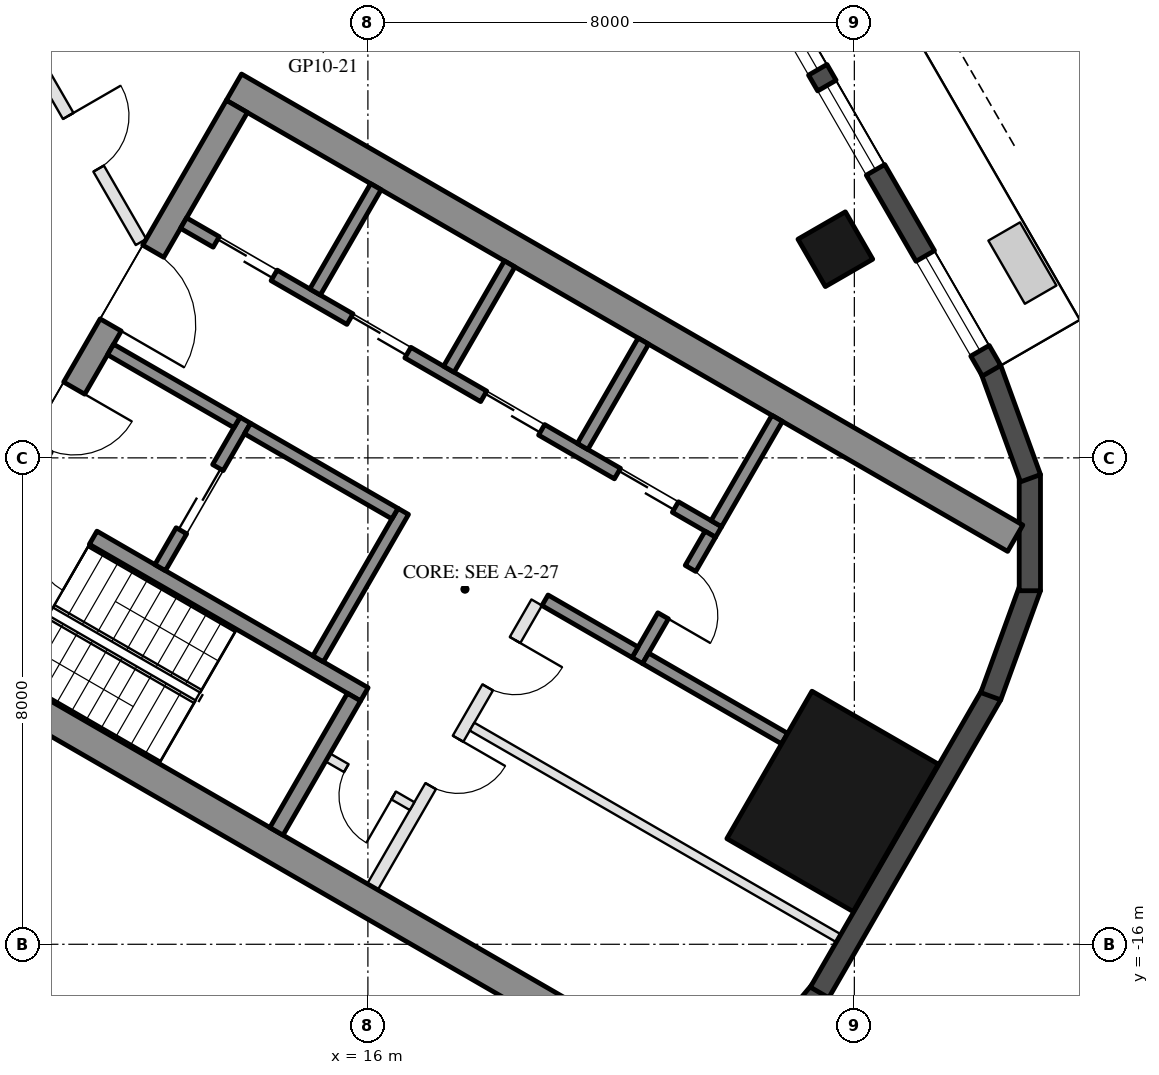
"""IFC4 building model, lengths in metres.
Left out: names, types, materials, properties, quantities, classifications, styles, units other than length and angle.
Written with IfcOpenShell. Run it as: python <this file> out.ifc"""

import sys

from ifc_helpers import new_model, si_unit, direction, frame, frame_2d, origin, origin_2d, place, context, subcontext, project, spatial, rectangle, hollow_rectangle, extrude, element, fill, save


model = new_model("IFC4")
c1 = context("Model", 3, precision=1e-05, world=origin(), true_north=direction((0.0, 1.0)))
c2 = subcontext(c1, "Body", "Model", "MODEL_VIEW")
j1 = project(units=[si_unit("LENGTHUNIT", "METRE"), si_unit("PLANEANGLEUNIT", "RADIAN")], contexts=[c1])
p1 = place(None, origin())
s1 = spatial("IfcSite", under=j1, at=p1, CompositionType="ELEMENT")
p2 = place(p1, origin())
s2 = spatial("IfcBuilding", under=s1, at=p2, CompositionType="ELEMENT")
p3 = place(p2, frame((0.0, 0.0, 120.5)))
s3 = spatial("IfcBuildingStorey", under=s2, at=p3, CompositionType="ELEMENT", Elevation=120.5)
p4 = place(p3, frame((23.688, -4.568, 0.0), z_axis=(0.0, 0.0, 1.0), x_axis=(-0.5, 0.866025403784, 0.0)))
e1 = element("IfcColumn", 1, at=p4, inside=s3, PredefinedType="COLUMN", context=c2, shape_type="SweptSolid", body=[
    extrude(hollow_rectangle(XDim=0.9, YDim=0.9, WallThickness=0.04, at=origin_2d()), origin(), (0.0, 0.0, 1.0), 3.7),
])
p5 = place(p3, frame((23.643, -13.65, 0.0), z_axis=(0.0, 0.0, 1.0), x_axis=(0.5, 0.866025403784, 0.0)))
e2 = element("IfcColumn", 2, at=p5, inside=s3, PredefinedType="COLUMN", context=c2, shape_type="SweptSolid", body=[
    extrude(hollow_rectangle(XDim=2.8, YDim=2.4, WallThickness=0.07, at=origin_2d()), origin(), (0.0, 0.0, 1.0), 3.7),
])
p6 = place(p3, frame((22.217, -18.231, 0.0), z_axis=(0.0, 0.0, 1.0), x_axis=(0.642733291068, 0.76609001857, 0.0)))
e3 = element("IfcWall", 3, at=p6, inside=s3, PredefinedType="SOLIDWALL", context=c2, shape_type="SweptSolid", body=[
    extrude(rectangle(XDim=1.91, YDim=0.35, at=frame_2d((0.955, 0.0))), origin(), (0.0, 0.0, 1.0), 3.55),
])
p7 = place(p3, frame((23.427, -16.792, 0.0), z_axis=(0.0, 0.0, 1.0), x_axis=(0.500018773155, 0.866014564827, 0.0)))
e4 = element("IfcWall", 4, at=p7, inside=s3, PredefinedType="SOLIDWALL", context=c2, shape_type="SweptSolid", body=[
    extrude(rectangle(XDim=5.658, YDim=0.35, at=frame_2d((2.829, 0.0))), origin(), (0.0, 0.0, 1.0), 3.55),
])
for number, where, z_axis, x_axis in (
    (5, (26.244, -11.92, 0.0), (0.0, 0.0, 1.0), (0.342, 0.94, 0.0)),
    (6, (26.886, -10.185, 0.0), (0.0, 0.0, 1.0), (0.0, 1.0, 0.0)),
    (7, (26.897, -8.335, 0.0), (0.0, 0.0, 1.0), (-0.342, 0.94, 0.0)),
):
    element("IfcWall", number, at=place(p3, frame(where, z_axis=z_axis, x_axis=x_axis)), inside=s3, PredefinedType="SOLIDWALL", context=c2, shape_type="SweptSolid", body=[
        extrude(rectangle(XDim=1.91, YDim=0.35, at=frame_2d((0.955, 0.0))), origin(), (0.0, 0.0, 1.0), 3.55),
    ])
p8 = place(p3, frame((26.257, -6.567, 0.0), z_axis=(0.0, 0.0, 1.0), x_axis=(-0.500023526245, 0.866011820475, 0.0)))
e8 = element("IfcWall", 8, at=p8, inside=s3, PredefinedType="SOLIDWALL", context=c2, shape_type="SweptSolid", body=[
    extrude(rectangle(XDim=11.816, YDim=0.35, at=frame_2d((5.908, 0.0))), origin(), (0.0, 0.0, 1.0), 3.55),
])
p9 = place(p8, frame((0.38, 0.0, 0.3)))
e9 = element("IfcOpeningElement", 9, at=p9, cuts=e8, PredefinedType="OPENING", context=c2, shape_type="SweptSolid", body=[
    extrude(rectangle(XDim=1.8, YDim=2.65, at=frame_2d((0.9, 1.325))), frame((0.0, 0.185, 0.0), z_axis=(0.0, -1.0, 0.0), x_axis=(1.0, 0.0, 0.0)), (0.0, 0.0, 1.0), 0.37),
])
p10 = place(p8, frame((7.716, 0.0, 0.0)))
e10 = element("IfcOpeningElement", 10, at=p10, cuts=e8, PredefinedType="OPENING", context=c2, shape_type="SweptSolid", body=[
    extrude(rectangle(XDim=2.4, YDim=2.4, at=frame_2d((1.2, 1.2))), frame((0.0, 0.185, 0.0), z_axis=(0.0, -1.0, 0.0), x_axis=(1.0, 0.0, 0.0)), (0.0, 0.0, 1.0), 0.37),
])
p11 = place(p8, frame((3.816, 0.0, 0.3)))
e11 = element("IfcOpeningElement", 11, at=p11, cuts=e8, PredefinedType="OPENING", context=c2, shape_type="SweptSolid", body=[
    extrude(rectangle(XDim=1.6, YDim=2.65, at=frame_2d((0.8, 1.325))), frame((0.0, 0.185, 0.0), z_axis=(0.0, -1.0, 0.0), x_axis=(1.0, 0.0, 0.0)), (0.0, 0.0, 1.0), 0.37),
])
p12 = place(p8, frame((5.716, 0.0, 0.3)))
e12 = element("IfcOpeningElement", 12, at=p12, cuts=e8, PredefinedType="OPENING", context=c2, shape_type="SweptSolid", body=[
    extrude(rectangle(XDim=1.6, YDim=2.65, at=frame_2d((0.8, 1.325))), frame((0.0, 0.185, 0.0), z_axis=(0.0, -1.0, 0.0), x_axis=(1.0, 0.0, 0.0)), (0.0, 0.0, 1.0), 0.37),
])
for number, where, z_axis, x_axis in (
    (13, (8.547, -10.997, 0.0), (0.0, 0.0, 1.0), (0.866, -0.5, 0.0)),
    (14, (13.797, -1.903, 0.0), (0.0, 0.0, 1.0), (0.866, -0.5, 0.0)),
):
    element("IfcWall", number, at=place(p3, frame(where, z_axis=z_axis, x_axis=x_axis)), inside=s3, PredefinedType="SHEAR", context=c2, shape_type="SweptSolid", body=[
        extrude(rectangle(XDim=14.837, YDim=0.5, at=frame_2d((7.418, 0.0))), origin(), (0.0, 0.0, 1.0), 3.5),
    ])
p13 = place(p3, frame((8.845, -10.88, 0.0), z_axis=(0.0, 0.0, 1.0), x_axis=(0.500004234368, 0.866022959057, 0.0)))
e15 = element("IfcWall", 15, at=p13, inside=s3, PredefinedType="SHEAR", context=c2, shape_type="SweptSolid", body=[
    extrude(rectangle(XDim=10.0, YDim=0.4, at=frame_2d((5.0, 0.0))), origin(), (0.0, 0.0, 1.0), 3.5),
])
p14 = place(p13, frame((3.55, 0.0, 0.0)))
e16 = element("IfcOpeningElement", 16, at=p14, cuts=e15, PredefinedType="OPENING", context=c2, shape_type="SweptSolid", body=[
    extrude(rectangle(XDim=1.1, YDim=2.1, at=frame_2d((0.55, 1.05))), frame((0.0, 0.21, 0.0), z_axis=(0.0, -1.0, 0.0), x_axis=(1.0, 0.0, 0.0)), (0.0, 0.0, 1.0), 0.42),
])
p15 = place(p13, frame((5.85, 0.0, 0.0)))
e17 = element("IfcOpeningElement", 17, at=p15, cuts=e15, PredefinedType="OPENING", context=c2, shape_type="SweptSolid", body=[
    extrude(rectangle(XDim=1.4, YDim=2.1, at=frame_2d((0.7, 1.05))), frame((0.0, 0.21, 0.0), z_axis=(0.0, -1.0, 0.0), x_axis=(1.0, 0.0, 0.0)), (0.0, 0.0, 1.0), 0.42),
])
p16 = place(p3, frame((10.356, -8.664, 0.0), z_axis=(0.0, 0.0, 1.0), x_axis=(0.866028629588, -0.499994412703, 0.0)))
e18 = element("IfcWall", 18, at=p16, inside=s3, PredefinedType="SHEAR", context=c2, shape_type="SweptSolid", body=[
    extrude(rectangle(XDim=6.45, YDim=0.25, at=frame_2d((3.225, 0.0))), origin(), (0.0, 0.0, 1.0), 3.5),
])
p17 = place(p16, frame((0.3, 0.0, 0.0)))
e19 = element("IfcOpeningElement", 19, at=p17, cuts=e18, PredefinedType="OPENING", context=c2, shape_type="SweptSolid", body=[
    extrude(rectangle(XDim=1.0, YDim=2.1, at=frame_2d((0.5, 1.05))), frame((0.0, 0.135, 0.0), z_axis=(0.0, -1.0, 0.0), x_axis=(1.0, 0.0, 0.0)), (0.0, 0.0, 1.0), 0.27),
])
p18 = place(p3, frame((14.496, -14.143, 0.0), z_axis=(0.0, 0.0, 1.0), x_axis=(0.500062241894, 0.865989465428, 0.0)))
e20 = element("IfcWall", 20, at=p18, inside=s3, PredefinedType="SHEAR", context=c2, shape_type="SweptSolid", body=[
    extrude(rectangle(XDim=2.55, YDim=0.25, at=frame_2d((1.275, 0.0))), origin(), (0.0, 0.0, 1.0), 3.5),
])
p19 = place(p3, frame((15.181, -11.305, 0.0), z_axis=(0.0, 0.0, 1.0), x_axis=(0.49994636267, 0.866056369097, 0.0)))
e21 = element("IfcWall", 21, at=p19, inside=s3, PredefinedType="SHEAR", context=c2, shape_type="SweptSolid", body=[
    extrude(rectangle(XDim=2.8, YDim=0.2, at=frame_2d((1.4, 0.0))), origin(), (0.0, 0.0, 1.0), 3.5),
])
p20 = place(p3, frame((12.583, -9.805, 0.0), z_axis=(0.0, 0.0, 1.0), x_axis=(0.49994636267, 0.866056369097, 0.0)))
e22 = element("IfcWall", 22, at=p20, inside=s3, PredefinedType="SHEAR", context=c2, shape_type="SweptSolid", body=[
    extrude(rectangle(XDim=2.8, YDim=0.2, at=frame_2d((1.4, 0.0))), origin(), (0.0, 0.0, 1.0), 3.5),
])
p21 = place(p20, frame((0.7, 0.0, 0.0)))
e23 = element("IfcOpeningElement", 23, at=p21, cuts=e22, PredefinedType="OPENING", context=c2, shape_type="SweptSolid", body=[
    extrude(rectangle(XDim=1.2, YDim=2.1, at=frame_2d((0.6, 1.05))), frame((0.0, 0.11, 0.0), z_axis=(0.0, -1.0, 0.0), x_axis=(1.0, 0.0, 0.0)), (0.0, 0.0, 1.0), 0.22),
])
p22 = place(p3, frame((11.768, -6.217, 0.0), z_axis=(0.0, 0.0, 1.0), x_axis=(0.866050077142, -0.499957262057, 0.0)))
e24 = element("IfcWall", 24, at=p22, inside=s3, PredefinedType="SHEAR", context=c2, shape_type="SweptSolid", body=[
    extrude(rectangle(XDim=2.4, YDim=0.2, at=frame_2d((1.2, 0.0))), origin(), (0.0, 0.0, 1.0), 3.5),
])
p23 = place(p3, frame((14.02, -7.517, 0.0), z_axis=(0.0, 0.0, 1.0), x_axis=(0.866034573852, -0.49998411664, 0.0)))
e25 = element("IfcWall", 25, at=p23, inside=s3, PredefinedType="SHEAR", context=c2, shape_type="SweptSolid", body=[
    extrude(rectangle(XDim=2.8, YDim=0.2, at=frame_2d((1.4, 0.0))), origin(), (0.0, 0.0, 1.0), 3.5),
])
p24 = place(p3, frame((12.968, -4.138, 0.0), z_axis=(0.0, 0.0, 1.0), x_axis=(0.866028328073, -0.49999493495, 0.0)))
e26 = element("IfcWall", 26, at=p24, inside=s3, PredefinedType="SHEAR", context=c2, shape_type="SweptSolid", body=[
    extrude(rectangle(XDim=10.16, YDim=0.2, at=frame_2d((5.08, 0.0))), origin(), (0.0, 0.0, 1.0), 3.5),
])
p25 = place(p24, frame((0.62, 0.0, 0.0)))
e27 = element("IfcOpeningElement", 27, at=p25, cuts=e26, PredefinedType="OPENING", context=c2, shape_type="SweptSolid", body=[
    extrude(rectangle(XDim=1.1, YDim=2.1, at=frame_2d((0.55, 1.05))), frame((0.0, 0.11, 0.0), z_axis=(0.0, -1.0, 0.0), x_axis=(1.0, 0.0, 0.0)), (0.0, 0.0, 1.0), 0.22),
])
p26 = place(p24, frame((3.16, 0.0, 0.0)))
e28 = element("IfcOpeningElement", 28, at=p26, cuts=e26, PredefinedType="OPENING", context=c2, shape_type="SweptSolid", body=[
    extrude(rectangle(XDim=1.1, YDim=2.1, at=frame_2d((0.55, 1.05))), frame((0.0, 0.11, 0.0), z_axis=(0.0, -1.0, 0.0), x_axis=(1.0, 0.0, 0.0)), (0.0, 0.0, 1.0), 0.22),
])
p27 = place(p24, frame((5.7, 0.0, 0.0)))
e29 = element("IfcOpeningElement", 29, at=p27, cuts=e26, PredefinedType="OPENING", context=c2, shape_type="SweptSolid", body=[
    extrude(rectangle(XDim=1.1, YDim=2.1, at=frame_2d((0.55, 1.05))), frame((0.0, 0.11, 0.0), z_axis=(0.0, -1.0, 0.0), x_axis=(1.0, 0.0, 0.0)), (0.0, 0.0, 1.0), 0.22),
])
p28 = place(p24, frame((8.24, 0.0, 0.0)))
e30 = element("IfcOpeningElement", 30, at=p28, cuts=e26, PredefinedType="OPENING", context=c2, shape_type="SweptSolid", body=[
    extrude(rectangle(XDim=1.1, YDim=2.1, at=frame_2d((0.55, 1.05))), frame((0.0, 0.11, 0.0), z_axis=(0.0, -1.0, 0.0), x_axis=(1.0, 0.0, 0.0)), (0.0, 0.0, 1.0), 0.22),
])
p29 = place(p3, frame((20.43, -11.333, 0.0), z_axis=(0.0, 0.0, 1.0), x_axis=(0.500001309137, 0.866024647952, 0.0)))
e31 = element("IfcWall", 31, at=p29, inside=s3, PredefinedType="SHEAR", context=c2, shape_type="SweptSolid", body=[
    extrude(rectangle(XDim=2.4, YDim=0.2, at=frame_2d((1.2, 0.0))), origin(), (0.0, 0.0, 1.0), 3.5),
])
p30 = place(p29, frame((0.85, 0.0, 0.0)))
e32 = element("IfcOpeningElement", 32, at=p30, cuts=e31, PredefinedType="OPENING", context=c2, shape_type="SweptSolid", body=[
    extrude(rectangle(XDim=0.9, YDim=2.1, at=frame_2d((0.45, 1.05))), frame((0.0, 0.11, 0.0), z_axis=(0.0, -1.0, 0.0), x_axis=(1.0, 0.0, 0.0)), (0.0, 0.0, 1.0), 0.22),
])
p31 = place(p3, frame((18.913, -10.342, 0.0), z_axis=(0.0, 0.0, 1.0), x_axis=(0.866038183914, -0.499977863513, 0.0)))
e33 = element("IfcWall", 33, at=p31, inside=s3, PredefinedType="SHEAR", context=c2, shape_type="SweptSolid", body=[
    extrude(rectangle(XDim=1.71, YDim=0.2, at=frame_2d((0.855, 0.0))), origin(), (0.0, 0.0, 1.0), 3.5),
])
for number, where, z_axis, x_axis in (
    (34, (15.131, -5.272, 0.0), (0.0, 0.0, 1.0), (0.5, 0.866, 0.0)),
    (35, (17.331, -6.542, 0.0), (0.0, 0.0, 1.0), (0.5, 0.866, 0.0)),
    (36, (19.531, -7.812, 0.0), (0.0, 0.0, 1.0), (0.5, 0.866, 0.0)),
    (37, (21.73, -9.082, 0.0), (0.0, 0.0, 1.0), (0.5, 0.866, 0.0)),
):
    element("IfcWall", number, at=place(p3, frame(where, z_axis=z_axis, x_axis=x_axis)), inside=s3, PredefinedType="SHEAR", context=c2, shape_type="SweptSolid", body=[
        extrude(rectangle(XDim=2.0, YDim=0.2, at=frame_2d((1.0, 0.0))), origin(), (0.0, 0.0, 1.0), 3.5),
    ])
p32 = place(p3, frame((20.567, -11.297, 0.0), z_axis=(0.0, 0.0, 1.0), x_axis=(0.866060851709, -0.499938597367, 0.0)))
e38 = element("IfcWall", 38, at=p32, inside=s3, PredefinedType="SHEAR", context=c2, shape_type="SweptSolid", body=[
    extrude(rectangle(XDim=2.64, YDim=0.2, at=frame_2d((1.32, 0.0))), origin(), (0.0, 0.0, 1.0), 3.5),
])
p33 = place(p3, frame((16.076, -15.055, 0.0), z_axis=(0.0, 0.0, 1.0), x_axis=(0.499995103361, 0.866028230842, 0.0)))
e39 = element("IfcWall", 39, at=p33, inside=s3, PredefinedType="PARTITIONING", context=c2, shape_type="SweptSolid", body=[
    extrude(rectangle(XDim=5.4, YDim=0.2, at=frame_2d((2.7, 0.0))), origin(), (0.0, 0.0, 1.0), 3.5),
])
p34 = place(p33, frame((1.913, 0.0, 0.0)))
e40 = element("IfcOpeningElement", 40, at=p34, cuts=e39, PredefinedType="OPENING", context=c2, shape_type="SweptSolid", body=[
    extrude(rectangle(XDim=0.9, YDim=2.1, at=frame_2d((0.45, 1.05))), frame((0.0, 0.11, 0.0), z_axis=(0.0, -1.0, 0.0), x_axis=(1.0, 0.0, 0.0)), (0.0, 0.0, 1.0), 0.22),
])
p35 = place(p33, frame((3.788, 0.0, 0.0)))
e41 = element("IfcOpeningElement", 41, at=p35, cuts=e39, PredefinedType="OPENING", context=c2, shape_type="SweptSolid", body=[
    extrude(rectangle(XDim=0.9, YDim=2.1, at=frame_2d((0.45, 1.05))), frame((0.0, 0.11, 0.0), z_axis=(0.0, -1.0, 0.0), x_axis=(1.0, 0.0, 0.0)), (0.0, 0.0, 1.0), 0.22),
])
p36 = place(p3, frame((15.342, -12.928, 0.0), z_axis=(0.0, 0.0, 1.0), x_axis=(0.865989903783, -0.500061482766, 0.0)))
e42 = element("IfcWall", 42, at=p36, inside=s3, PredefinedType="PARTITIONING", context=c2, shape_type="SweptSolid", body=[
    extrude(rectangle(XDim=1.6, YDim=0.15, at=frame_2d((0.8, 0.0))), origin(), (0.0, 0.0, 1.0), 3.5),
])
p37 = place(p36, frame((0.35, 0.0, 0.0)))
e43 = element("IfcOpeningElement", 43, at=p37, cuts=e42, PredefinedType="OPENING", context=c2, shape_type="SweptSolid", body=[
    extrude(rectangle(XDim=0.9, YDim=2.1, at=frame_2d((0.45, 1.05))), frame((0.0, 0.085, 0.0), z_axis=(0.0, -1.0, 0.0), x_axis=(1.0, 0.0, 0.0)), (0.0, 0.0, 1.0), 0.17),
])
p38 = place(p3, frame((17.713, -12.42, 0.0), z_axis=(0.0, 0.0, 1.0), x_axis=(0.866016523273, -0.500015381182, 0.0)))
e44 = element("IfcWall", 44, at=p38, inside=s3, PredefinedType="PARTITIONING", context=c2, shape_type="SweptSolid", body=[
    extrude(rectangle(XDim=6.95, YDim=0.15, at=frame_2d((3.475, 0.0))), origin(), (0.0, 0.0, 1.0), 3.5),
])
p39 = place(p3, frame((10.375, -1.169, 0.0), z_axis=(0.0, 0.0, 1.0), x_axis=(0.500055316652, -0.865993464345, 0.0)))
e45 = element("IfcWall", 45, at=p39, inside=s3, PredefinedType="PARTITIONING", context=c2, shape_type="SweptSolid", body=[
    extrude(rectangle(XDim=3.788, YDim=0.2, at=frame_2d((1.894, 0.0))), origin(), (0.0, 0.0, 1.0), 2.95),
])
p40 = place(p39, frame((1.394, 0.0, 0.0)))
e46 = element("IfcOpeningElement", 46, at=p40, cuts=e45, PredefinedType="OPENING", context=c2, shape_type="SweptSolid", body=[
    extrude(rectangle(XDim=1.0, YDim=2.1, at=frame_2d((0.5, 1.05))), frame((0.0, 0.11, 0.0), z_axis=(0.0, -1.0, 0.0), x_axis=(1.0, 0.0, 0.0)), (0.0, 0.0, 1.0), 0.22),
])
p41 = place(p9, origin())
e47 = element("IfcWindow", 47, at=p41, inside=s3, PartitioningType="SINGLE_PANEL", PredefinedType="WINDOW", context=c2, shape_type="SweptSolid", body=[
    extrude(rectangle(XDim=1.8, YDim=2.65, at=frame_2d((0.9, 1.325))), frame((0.0, 0.03, 0.0), z_axis=(0.0, -1.0, 0.0), x_axis=(1.0, 0.0, 0.0)), (0.0, 0.0, 1.0), 0.06),
])
fill(e9, e47)
p42 = place(p11, origin())
e48 = element("IfcWindow", 48, at=p42, inside=s3, PartitioningType="SINGLE_PANEL", PredefinedType="WINDOW", context=c2, shape_type="SweptSolid", body=[
    extrude(rectangle(XDim=1.6, YDim=2.65, at=frame_2d((0.8, 1.325))), frame((0.0, 0.03, 0.0), z_axis=(0.0, -1.0, 0.0), x_axis=(1.0, 0.0, 0.0)), (0.0, 0.0, 1.0), 0.06),
])
fill(e11, e48)
p43 = place(p12, origin())
e49 = element("IfcWindow", 49, at=p43, inside=s3, PartitioningType="SINGLE_PANEL", PredefinedType="WINDOW", context=c2, shape_type="SweptSolid", body=[
    extrude(rectangle(XDim=1.6, YDim=2.65, at=frame_2d((0.8, 1.325))), frame((0.0, 0.03, 0.0), z_axis=(0.0, -1.0, 0.0), x_axis=(1.0, 0.0, 0.0)), (0.0, 0.0, 1.0), 0.06),
])
fill(e12, e49)
p44 = place(p21, origin())
e50 = element("IfcDoor", 50, at=p44, inside=s3, OperationType="DOUBLE_DOOR_SLIDING", PredefinedType="DOOR", context=c2, shape_type="SweptSolid", body=[
    extrude(rectangle(XDim=1.2, YDim=2.1, at=frame_2d((0.6, 1.05))), frame((0.0, 0.025, 0.0), z_axis=(0.0, -1.0, 0.0), x_axis=(1.0, 0.0, 0.0)), (0.0, 0.0, 1.0), 0.05),
])
fill(e23, e50)
p45 = place(p37, frame((0.9, 0.0, 0.0), z_axis=(0.0, 0.0, 1.0), x_axis=(-1.0, 0.0, 0.0)))
e51 = element("IfcDoor", 51, at=p45, inside=s3, OperationType="SINGLE_SWING_LEFT", PredefinedType="DOOR", context=c2, shape_type="SweptSolid", body=[
    extrude(rectangle(XDim=0.9, YDim=2.1, at=frame_2d((0.45, 1.05))), frame((0.0, 0.025, 0.0), z_axis=(0.0, -1.0, 0.0), x_axis=(1.0, 0.0, 0.0)), (0.0, 0.0, 1.0), 0.05),
])
fill(e43, e51)
p46 = place(p25, origin())
e52 = element("IfcDoor", 52, at=p46, inside=s3, OperationType="DOUBLE_DOOR_SLIDING", PredefinedType="DOOR", context=c2, shape_type="SweptSolid", body=[
    extrude(rectangle(XDim=1.1, YDim=2.1, at=frame_2d((0.55, 1.05))), frame((0.0, 0.025, 0.0), z_axis=(0.0, -1.0, 0.0), x_axis=(1.0, 0.0, 0.0)), (0.0, 0.0, 1.0), 0.05),
])
fill(e27, e52)
p47 = place(p26, origin())
e53 = element("IfcDoor", 53, at=p47, inside=s3, OperationType="DOUBLE_DOOR_SLIDING", PredefinedType="DOOR", context=c2, shape_type="SweptSolid", body=[
    extrude(rectangle(XDim=1.1, YDim=2.1, at=frame_2d((0.55, 1.05))), frame((0.0, 0.025, 0.0), z_axis=(0.0, -1.0, 0.0), x_axis=(1.0, 0.0, 0.0)), (0.0, 0.0, 1.0), 0.05),
])
fill(e28, e53)
p48 = place(p27, origin())
e54 = element("IfcDoor", 54, at=p48, inside=s3, OperationType="DOUBLE_DOOR_SLIDING", PredefinedType="DOOR", context=c2, shape_type="SweptSolid", body=[
    extrude(rectangle(XDim=1.1, YDim=2.1, at=frame_2d((0.55, 1.05))), frame((0.0, 0.025, 0.0), z_axis=(0.0, -1.0, 0.0), x_axis=(1.0, 0.0, 0.0)), (0.0, 0.0, 1.0), 0.05),
])
fill(e29, e54)
p49 = place(p28, origin())
e55 = element("IfcDoor", 55, at=p49, inside=s3, OperationType="DOUBLE_DOOR_SLIDING", PredefinedType="DOOR", context=c2, shape_type="SweptSolid", body=[
    extrude(rectangle(XDim=1.1, YDim=2.1, at=frame_2d((0.55, 1.05))), frame((0.0, 0.025, 0.0), z_axis=(0.0, -1.0, 0.0), x_axis=(1.0, 0.0, 0.0)), (0.0, 0.0, 1.0), 0.05),
])
fill(e30, e55)
p50 = place(p30, frame((0.9, 0.0, 0.0), z_axis=(0.0, 0.0, 1.0), x_axis=(-1.0, 0.0, 0.0)))
e56 = element("IfcDoor", 56, at=p50, inside=s3, OperationType="SINGLE_SWING_RIGHT", PredefinedType="DOOR", context=c2, shape_type="SweptSolid", body=[
    extrude(rectangle(XDim=0.9, YDim=2.1, at=frame_2d((0.45, 1.05))), frame((0.0, 0.025, 0.0), z_axis=(0.0, -1.0, 0.0), x_axis=(1.0, 0.0, 0.0)), (0.0, 0.0, 1.0), 0.05),
])
fill(e32, e56)
p51 = place(p34, frame((0.9, 0.0, 0.0), z_axis=(0.0, 0.0, 1.0), x_axis=(-1.0, 0.0, 0.0)))
e57 = element("IfcDoor", 57, at=p51, inside=s3, OperationType="SINGLE_SWING_LEFT", PredefinedType="DOOR", context=c2, shape_type="SweptSolid", body=[
    extrude(rectangle(XDim=0.9, YDim=2.1, at=frame_2d((0.45, 1.05))), frame((0.0, 0.025, 0.0), z_axis=(0.0, -1.0, 0.0), x_axis=(1.0, 0.0, 0.0)), (0.0, 0.0, 1.0), 0.05),
])
fill(e40, e57)
p52 = place(p35, frame((0.9, 0.0, 0.0), z_axis=(0.0, 0.0, 1.0), x_axis=(-1.0, 0.0, 0.0)))
e58 = element("IfcDoor", 58, at=p52, inside=s3, OperationType="SINGLE_SWING_LEFT", PredefinedType="DOOR", context=c2, shape_type="SweptSolid", body=[
    extrude(rectangle(XDim=0.9, YDim=2.1, at=frame_2d((0.45, 1.05))), frame((0.0, 0.025, 0.0), z_axis=(0.0, -1.0, 0.0), x_axis=(1.0, 0.0, 0.0)), (0.0, 0.0, 1.0), 0.05),
])
fill(e41, e58)
p53 = place(p14, frame((1.1, 0.0, 0.0), z_axis=(0.0, 0.0, 1.0), x_axis=(-1.0, 0.0, 0.0)))
e59 = element("IfcDoor", 59, at=p53, inside=s3, OperationType="SINGLE_SWING_LEFT", PredefinedType="DOOR", context=c2, shape_type="SweptSolid", body=[
    extrude(rectangle(XDim=1.1, YDim=2.1, at=frame_2d((0.55, 1.05))), frame((0.0, 0.025, 0.0), z_axis=(0.0, -1.0, 0.0), x_axis=(1.0, 0.0, 0.0)), (0.0, 0.0, 1.0), 0.05),
])
fill(e16, e59)
p54 = place(p15, frame((1.4, 0.0, 0.0), z_axis=(0.0, 0.0, 1.0), x_axis=(-1.0, 0.0, 0.0)))
e60 = element("IfcDoor", 60, at=p54, inside=s3, OperationType="DOUBLE_DOOR_SINGLE_SWING", PredefinedType="DOOR", context=c2, shape_type="SweptSolid", body=[
    extrude(rectangle(XDim=1.4, YDim=2.1, at=frame_2d((0.7, 1.05))), frame((0.0, 0.025, 0.0), z_axis=(0.0, -1.0, 0.0), x_axis=(1.0, 0.0, 0.0)), (0.0, 0.0, 1.0), 0.05),
])
fill(e17, e60)
p55 = place(p17, frame((1.0, 0.0, 0.0), z_axis=(0.0, 0.0, 1.0), x_axis=(-1.0, 0.0, 0.0)))
e61 = element("IfcDoor", 61, at=p55, inside=s3, OperationType="SINGLE_SWING_LEFT", PredefinedType="DOOR", context=c2, shape_type="SweptSolid", body=[
    extrude(rectangle(XDim=1.0, YDim=2.1, at=frame_2d((0.5, 1.05))), frame((0.0, 0.025, 0.0), z_axis=(0.0, -1.0, 0.0), x_axis=(1.0, 0.0, 0.0)), (0.0, 0.0, 1.0), 0.05),
])
fill(e19, e61)
p56 = place(p40, origin())
e62 = element("IfcDoor", 62, at=p56, inside=s3, OperationType="SINGLE_SWING_LEFT", PredefinedType="DOOR", context=c2, shape_type="SweptSolid", body=[
    extrude(rectangle(XDim=1.0, YDim=2.1, at=frame_2d((0.5, 1.05))), frame((0.0, 0.025, 0.0), z_axis=(0.0, -1.0, 0.0), x_axis=(1.0, 0.0, 0.0)), (0.0, 0.0, 1.0), 0.05),
])
fill(e46, e62)
save(model, sys.argv[1])
